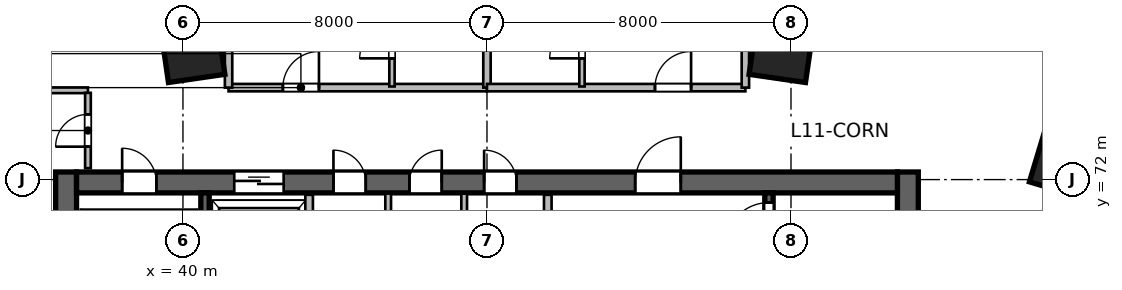
"""IFC4 building model, lengths in metres.
Left out: names, types, materials, properties, quantities, classifications, styles, units other than length and angle.
Written with IfcOpenShell. Run it as: python <this file> out.ifc"""

import sys

from ifc_helpers import new_model, si_unit, direction, frame, frame_2d, origin, origin_2d, place, context, subcontext, project, spatial, rectangle, extrude, source, transform, mapped, element, fill, save


model = new_model("IFC4")
c1 = context("Model", 3, precision=1e-05, world=origin(), true_north=direction((0.0, 1.0)))
c2 = subcontext(c1, "Body", "Model", "MODEL_VIEW")
j1 = project(units=[si_unit("LENGTHUNIT", "METRE"), si_unit("PLANEANGLEUNIT", "RADIAN")], contexts=[c1])
p1 = place(None, origin())
s1 = spatial("IfcSite", under=j1, at=p1, CompositionType="ELEMENT")
p2 = place(p1, origin())
s2 = spatial("IfcBuilding", under=s1, at=p2, CompositionType="ELEMENT")
p3 = place(p2, frame((0.0, 0.0, 53.4)))
s3 = spatial("IfcBuildingStorey", under=s2, at=p3, CompositionType="ELEMENT", Elevation=53.4)
m1 = source(origin(), c2, "Body", "SweptSolid", [
    extrude(rectangle(XDim=12.0, YDim=0.55, at=frame_2d((6.0, 0.0))), origin(), (0.0, 0.0, 1.0), 3.6),
])
for number, where, z_axis, x_axis in (
    (1, (36.925, 60.2, 0.0), (0.0, 0.0, 1.0), (0.0, 1.0, 0.0)),
    (2, (59.075, 60.2, 0.0), (0.0, 0.0, 1.0), (0.0, 1.0, 0.0)),
):
    element("IfcWall", number, at=place(p3, frame(where, z_axis=z_axis, x_axis=x_axis)), inside=s3, PredefinedType="SHEAR", context=c2, shape_type="MappedRepresentation", body=[
        mapped(m1, transform((0.0, 0.0, 0.0), scale=1.0)),
    ])
m2 = source(origin(), c2, "Body", "SweptSolid", [
    extrude(rectangle(XDim=21.6, YDim=0.55, at=frame_2d((10.8, 0.0))), origin(), (0.0, 0.0, 1.0), 3.6),
])
p4 = place(p3, frame((37.2, 71.925, 0.0), z_axis=(0.0, 0.0, 1.0), x_axis=(1.0, 0.0, 0.0)))
e3 = element("IfcWall", 3, at=p4, inside=s3, PredefinedType="SHEAR", context=c2, shape_type="MappedRepresentation", body=[
    mapped(m2, transform((0.0, 0.0, 0.0), scale=1.0)),
])
p5 = place(p4, frame((1.2, 0.0, 0.0)))
e4 = element("IfcOpeningElement", 4, at=p5, cuts=e3, PredefinedType="OPENING", context=c2, shape_type="SweptSolid", body=[
    extrude(rectangle(XDim=0.9, YDim=2.1, at=frame_2d((0.45, 1.05))), frame((0.0, 0.285, 0.0), z_axis=(0.0, -1.0, 0.0), x_axis=(1.0, 0.0, 0.0)), (0.0, 0.0, 1.0), 0.57),
])
p6 = place(p4, frame((14.7, 0.0, 0.0)))
e5 = element("IfcOpeningElement", 5, at=p6, cuts=e3, PredefinedType="OPENING", context=c2, shape_type="SweptSolid", body=[
    extrude(rectangle(XDim=1.2, YDim=2.15, at=frame_2d((0.6, 1.075))), frame((0.0, 0.285, 0.0), z_axis=(0.0, -1.0, 0.0), x_axis=(1.0, 0.0, 0.0)), (0.0, 0.0, 1.0), 0.57),
])
p7 = place(p4, frame((4.15, 0.0, 0.0)))
e6 = element("IfcOpeningElement", 6, at=p7, cuts=e3, PredefinedType="OPENING", context=c2, shape_type="SweptSolid", body=[
    extrude(rectangle(XDim=1.3, YDim=2.15, at=frame_2d((0.65, 1.075))), frame((0.0, 0.285, 0.0), z_axis=(0.0, -1.0, 0.0), x_axis=(1.0, 0.0, 0.0)), (0.0, 0.0, 1.0), 0.57),
])
p8 = place(p4, frame((6.76, 0.0, 0.0)))
e7 = element("IfcOpeningElement", 7, at=p8, cuts=e3, PredefinedType="OPENING", context=c2, shape_type="SweptSolid", body=[
    extrude(rectangle(XDim=0.85, YDim=2.1, at=frame_2d((0.425, 1.05))), frame((0.0, 0.285, 0.0), z_axis=(0.0, -1.0, 0.0), x_axis=(1.0, 0.0, 0.0)), (0.0, 0.0, 1.0), 0.57),
])
p9 = place(p4, frame((8.76, 0.0, 0.0)))
e8 = element("IfcOpeningElement", 8, at=p9, cuts=e3, PredefinedType="OPENING", context=c2, shape_type="SweptSolid", body=[
    extrude(rectangle(XDim=0.85, YDim=2.1, at=frame_2d((0.425, 1.05))), frame((0.0, 0.285, 0.0), z_axis=(0.0, -1.0, 0.0), x_axis=(1.0, 0.0, 0.0)), (0.0, 0.0, 1.0), 0.57),
])
p10 = place(p4, frame((10.725, 0.0, 0.0)))
e9 = element("IfcOpeningElement", 9, at=p10, cuts=e3, PredefinedType="OPENING", context=c2, shape_type="SweptSolid", body=[
    extrude(rectangle(XDim=0.85, YDim=2.1, at=frame_2d((0.425, 1.05))), frame((0.0, 0.285, 0.0), z_axis=(0.0, -1.0, 0.0), x_axis=(1.0, 0.0, 0.0)), (0.0, 0.0, 1.0), 0.57),
])
m3 = source(origin(), c2, "Body", "SweptSolid", [
    extrude(rectangle(XDim=10.9, YDim=0.22, at=frame_2d((5.45, 0.0))), origin(), (0.0, 0.0, 1.0), 3.6),
])
p11 = place(p3, frame((40.58, 60.75, 0.0), z_axis=(0.0, 0.0, 1.0), x_axis=(0.0, 1.0, 0.0)))
e10 = element("IfcWall", 10, at=p11, inside=s3, PredefinedType="SHEAR", context=c2, shape_type="MappedRepresentation", body=[
    mapped(m3, transform((0.0, 0.0, 0.0), scale=1.0)),
])
p12 = place(p3, frame((55.42, 60.75, 0.0), z_axis=(0.0, 0.0, 1.0), x_axis=(0.0, 1.0, 0.0)))
e11 = element("IfcWall", 11, at=p12, inside=s3, PredefinedType="SHEAR", context=c2, shape_type="MappedRepresentation", body=[
    mapped(m3, transform((0.0, 0.0, 0.0), scale=1.0)),
])
p13 = place(p12, frame((9.495, 0.0, 0.0)))
e12 = element("IfcOpeningElement", 12, at=p13, cuts=e11, PredefinedType="OPENING", context=c2, shape_type="SweptSolid", body=[
    extrude(rectangle(XDim=1.15, YDim=2.15, at=frame_2d((0.575, 1.075))), frame((0.0, 0.12, 0.0), z_axis=(0.0, -1.0, 0.0), x_axis=(1.0, 0.0, 0.0)), (0.0, 0.0, 1.0), 0.24),
])
m4 = source(origin(), c2, "Body", "SweptSolid", [
    extrude(rectangle(XDim=1.5, YDim=1.5, at=origin_2d()), origin(), (0.0, 0.0, 1.0), 3.6),
])
for number, where, z_axis, x_axis in (
    (13, (40.253, 75.404, 0.0), (0.0, 0.0, 1.0), (-0.143, 0.99, 0.0)),
    (14, (55.747, 75.404, 0.0), (0.0, 0.0, 1.0), (0.143, 0.99, 0.0)),
    (15, (63.209, 72.442, 0.0), (0.0, 0.0, 1.0), (0.289, 0.957, 0.0)),
):
    element("IfcColumn", number, at=place(p3, frame(where, z_axis=z_axis, x_axis=x_axis)), inside=s3, PredefinedType="COLUMN", context=c2, shape_type="MappedRepresentation", body=[
        mapped(m4, transform((0.0, 0.0, 0.0), scale=1.0)),
    ])
m5 = source(origin(), c2, "Body", "SweptSolid", [
    extrude(rectangle(XDim=5.8, YDim=0.2, at=frame_2d((2.9, 0.0))), origin(), (0.0, 0.0, 1.0), 3.36),
])
p14 = place(p3, frame((49.6, 65.8, 0.0), z_axis=(0.0, 0.0, 1.0), x_axis=(0.0, 1.0, 0.0)))
e16 = element("IfcWall", 16, at=p14, inside=s3, PredefinedType="SOLIDWALL", context=c2, shape_type="MappedRepresentation", body=[
    mapped(m5, transform((0.0, 0.0, 0.0), scale=1.0)),
])
m6 = source(origin(), c2, "Body", "SweptSolid", [
    extrude(rectangle(XDim=3.2, YDim=0.2, at=frame_2d((1.6, 0.0))), origin(), (0.0, 0.0, 1.0), 3.36),
])
p15 = place(p3, frame((43.32, 68.4, 0.0), z_axis=(0.0, 0.0, 1.0), x_axis=(0.0, 1.0, 0.0)))
e17 = element("IfcWall", 17, at=p15, inside=s3, PredefinedType="SOLIDWALL", context=c2, shape_type="MappedRepresentation", body=[
    mapped(m6, transform((0.0, 0.0, 0.0), scale=1.0)),
])
m7 = source(origin(), c2, "Body", "SweptSolid", [
    extrude(rectangle(XDim=3.23, YDim=0.15, at=frame_2d((1.615, 0.0))), origin(), (0.0, 0.0, 1.0), 3.36),
])
for number, where, z_axis, x_axis in (
    (18, (45.4, 68.4, 0.0), (0.0, 0.0, 1.0), (0.0, 1.0, 0.0)),
    (19, (47.4, 68.4, 0.0), (0.0, 0.0, 1.0), (0.0, 1.0, 0.0)),
):
    element("IfcWall", number, at=place(p3, frame(where, z_axis=z_axis, x_axis=x_axis)), inside=s3, PredefinedType="PARTITIONING", context=c2, shape_type="MappedRepresentation", body=[
        mapped(m7, transform((0.0, 0.0, 0.0), scale=1.0)),
    ])
m8 = source(origin(), c2, "Body", "SweptSolid", [
    extrude(rectangle(XDim=3.1, YDim=0.15, at=frame_2d((1.55, 0.0))), origin(), (0.0, 0.0, 1.0), 2.729),
])
p16 = place(p3, frame((34.4, 74.35, 0.0), z_axis=(0.0, 0.0, 1.0), x_axis=(1.0, 0.0, 0.0)))
e20 = element("IfcWall", 20, at=p16, inside=s3, PredefinedType="PARTITIONING", context=c2, shape_type="MappedRepresentation", body=[
    mapped(m8, transform((0.0, 0.0, 0.0), scale=1.0)),
])
m9 = source(origin(), c2, "Body", "SweptSolid", [
    extrude(rectangle(XDim=1.982, YDim=0.15, at=frame_2d((0.991, 0.0))), origin(), (0.0, 0.0, 1.0), 3.36),
])
p17 = place(p3, frame((37.5, 72.3, 0.0), z_axis=(0.0, 0.0, 1.0), x_axis=(0.0, 1.0, 0.0)))
e21 = element("IfcWall", 21, at=p17, inside=s3, PredefinedType="PARTITIONING", context=c2, shape_type="MappedRepresentation", body=[
    mapped(m9, transform((0.0, 0.0, 0.0), scale=1.0)),
])
p18 = place(p17, frame((0.566, 0.0, 0.0)))
e22 = element("IfcOpeningElement", 22, at=p18, cuts=e21, PredefinedType="OPENING", context=c2, shape_type="SweptSolid", body=[
    extrude(rectangle(XDim=0.85, YDim=2.1, at=frame_2d((0.425, 1.05))), frame((0.0, 0.085, 0.0), z_axis=(0.0, -1.0, 0.0), x_axis=(1.0, 0.0, 0.0)), (0.0, 0.0, 1.0), 0.17),
])
m10 = source(origin(), c2, "Body", "SweptSolid", [
    extrude(rectangle(XDim=6.8, YDim=0.195, at=frame_2d((3.4, 0.0))), origin(), (0.0, 0.0, 1.0), 3.36),
])
p19 = place(p3, frame((41.2, 74.42, 0.0), z_axis=(0.0, 0.0, 1.0), x_axis=(1.0, 0.0, 0.0)))
e23 = element("IfcWall", 23, at=p19, inside=s3, PredefinedType="PARTITIONING", context=c2, shape_type="MappedRepresentation", body=[
    mapped(m10, transform((0.0, 0.0, 0.0), scale=1.0)),
])
p20 = place(p19, frame((1.429, 0.0, 0.0)))
e24 = element("IfcOpeningElement", 24, at=p20, cuts=e23, PredefinedType="OPENING", context=c2, shape_type="SweptSolid", body=[
    extrude(rectangle(XDim=0.95, YDim=2.15, at=frame_2d((0.475, 1.075))), frame((0.0, 0.107, 0.0), z_axis=(0.0, -1.0, 0.0), x_axis=(1.0, 0.0, 0.0)), (0.0, 0.0, 1.0), 0.215),
])
m11 = source(origin(), c2, "Body", "SweptSolid", [
    extrude(rectangle(XDim=6.216, YDim=0.195, at=frame_2d((3.108, 0.0))), origin(), (0.0, 0.0, 1.0), 2.644),
])
p21 = place(p3, frame((48.0, 74.42, 0.0), z_axis=(0.0, 0.0, 1.0), x_axis=(0.0, 1.0, 0.0)))
e25 = element("IfcWall", 25, at=p21, inside=s3, PredefinedType="PARTITIONING", context=c2, shape_type="MappedRepresentation", body=[
    mapped(m11, transform((0.0, 0.0, 0.0), scale=1.0)),
])
m12 = source(origin(), c2, "Body", "SweptSolid", [
    extrude(rectangle(XDim=5.426, YDim=0.195, at=frame_2d((2.713, 0.0))), origin(), (0.0, 0.0, 1.0), 3.36),
])
p22 = place(p3, frame((41.2, 74.42, 0.0), z_axis=(0.0, 0.0, 1.0), x_axis=(0.0, 1.0, 0.0)))
e26 = element("IfcWall", 26, at=p22, inside=s3, PredefinedType="PARTITIONING", context=c2, shape_type="MappedRepresentation", body=[
    mapped(m12, transform((0.0, 0.0, 0.0), scale=1.0)),
])
m13 = source(origin(), c2, "Body", "SweptSolid", [
    extrude(rectangle(XDim=2.33, YDim=0.14, at=frame_2d((1.165, 0.0))), origin(), (0.0, 0.0, 1.0), 3.36),
])
p23 = place(p3, frame((45.5, 74.45, 0.0), z_axis=(0.0, 0.0, 1.0), x_axis=(0.0, 1.0, 0.0)))
e27 = element("IfcWall", 27, at=p23, inside=s3, PredefinedType="PARTITIONING", context=c2, shape_type="MappedRepresentation", body=[
    mapped(m13, transform((0.0, 0.0, 0.0), scale=1.0)),
])
p24 = place(p23, frame((0.74, 0.0, 0.0)))
e28 = element("IfcOpeningElement", 28, at=p24, cuts=e27, PredefinedType="OPENING", context=c2, shape_type="SweptSolid", body=[
    extrude(rectangle(XDim=0.85, YDim=2.05, at=frame_2d((0.425, 1.025))), frame((0.0, 0.08, 0.0), z_axis=(0.0, -1.0, 0.0), x_axis=(1.0, 0.0, 0.0)), (0.0, 0.0, 1.0), 0.16),
])
p25 = place(p3, frame((48.0, 74.42, 0.0), z_axis=(0.0, 0.0, 1.0), x_axis=(1.0, 0.0, 0.0)))
e29 = element("IfcWall", 29, at=p25, inside=s3, PredefinedType="PARTITIONING", context=c2, shape_type="MappedRepresentation", body=[
    mapped(m10, transform((0.0, 0.0, 0.0), scale=1.0)),
])
p26 = place(p25, frame((4.421, 0.0, 0.0)))
e30 = element("IfcOpeningElement", 30, at=p26, cuts=e29, PredefinedType="OPENING", context=c2, shape_type="SweptSolid", body=[
    extrude(rectangle(XDim=0.95, YDim=2.15, at=frame_2d((0.475, 1.075))), frame((0.0, 0.107, 0.0), z_axis=(0.0, -1.0, 0.0), x_axis=(1.0, 0.0, 0.0)), (0.0, 0.0, 1.0), 0.215),
])
p27 = place(p3, frame((54.8, 74.42, 0.0), z_axis=(0.0, 0.0, 1.0), x_axis=(0.0, 1.0, 0.0)))
e31 = element("IfcWall", 31, at=p27, inside=s3, PredefinedType="PARTITIONING", context=c2, shape_type="MappedRepresentation", body=[
    mapped(m12, transform((0.0, 0.0, 0.0), scale=1.0)),
])
p28 = place(p3, frame((50.5, 74.45, 0.0), z_axis=(0.0, 0.0, 1.0), x_axis=(0.0, 1.0, 0.0)))
e32 = element("IfcWall", 32, at=p28, inside=s3, PredefinedType="PARTITIONING", context=c2, shape_type="MappedRepresentation", body=[
    mapped(m13, transform((0.0, 0.0, 0.0), scale=1.0)),
])
p29 = place(p28, frame((0.74, 0.0, 0.0)))
e33 = element("IfcOpeningElement", 33, at=p29, cuts=e32, PredefinedType="OPENING", context=c2, shape_type="SweptSolid", body=[
    extrude(rectangle(XDim=0.85, YDim=2.05, at=frame_2d((0.425, 1.025))), frame((0.0, 0.08, 0.0), z_axis=(0.0, -1.0, 0.0), x_axis=(1.0, 0.0, 0.0)), (0.0, 0.0, 1.0), 0.16),
])
m14 = source(origin(), c2, "Body", "SweptSolid", [
    extrude(rectangle(XDim=0.9, YDim=2.1, at=frame_2d((0.45, 1.05))), frame((0.0, 0.025, 0.0), z_axis=(0.0, -1.0, 0.0), x_axis=(1.0, 0.0, 0.0)), (0.0, 0.0, 1.0), 0.05),
])
p30 = place(p5, origin())
e34 = element("IfcDoor", 34, at=p30, inside=s3, OperationType="SINGLE_SWING_LEFT", PredefinedType="DOOR", context=c2, shape_type="MappedRepresentation", body=[
    mapped(m14, transform((0.0, 0.0, 0.0), scale=1.0)),
])
fill(e4, e34)
m15 = source(origin(), c2, "Body", "SweptSolid", [
    extrude(rectangle(XDim=1.15, YDim=2.15, at=frame_2d((0.575, 1.075))), frame((0.0, 0.025, 0.0), z_axis=(0.0, -1.0, 0.0), x_axis=(1.0, 0.0, 0.0)), (0.0, 0.0, 1.0), 0.05),
])
p31 = place(p13, origin())
e35 = element("IfcDoor", 35, at=p31, inside=s3, OperationType="SINGLE_SWING_LEFT", PredefinedType="DOOR", context=c2, shape_type="MappedRepresentation", body=[
    mapped(m15, transform((0.0, 0.0, 0.0), scale=1.0)),
])
fill(e12, e35)
m16 = source(origin(), c2, "Body", "SweptSolid", [
    extrude(rectangle(XDim=1.2, YDim=2.15, at=frame_2d((0.6, 1.075))), frame((0.0, 0.025, 0.0), z_axis=(0.0, -1.0, 0.0), x_axis=(1.0, 0.0, 0.0)), (0.0, 0.0, 1.0), 0.05),
])
p32 = place(p6, origin())
e36 = element("IfcDoor", 36, at=p32, inside=s3, OperationType="SINGLE_SWING_RIGHT", PredefinedType="DOOR", context=c2, shape_type="MappedRepresentation", body=[
    mapped(m16, transform((0.0, 0.0, 0.0), scale=1.0)),
])
fill(e5, e36)
m17 = source(origin(), c2, "Body", "SweptSolid", [
    extrude(rectangle(XDim=1.3, YDim=2.15, at=frame_2d((0.65, 1.075))), frame((0.0, 0.025, 0.0), z_axis=(0.0, -1.0, 0.0), x_axis=(1.0, 0.0, 0.0)), (0.0, 0.0, 1.0), 0.05),
])
p33 = place(p7, origin())
e37 = element("IfcDoor", 37, at=p33, inside=s3, OperationType="DOUBLE_DOOR_SLIDING", PredefinedType="DOOR", context=c2, shape_type="MappedRepresentation", body=[
    mapped(m17, transform((0.0, 0.0, 0.0), scale=1.0)),
])
fill(e6, e37)
m18 = source(origin(), c2, "Body", "SweptSolid", [
    extrude(rectangle(XDim=0.85, YDim=2.1, at=frame_2d((0.425, 1.05))), frame((0.0, 0.025, 0.0), z_axis=(0.0, -1.0, 0.0), x_axis=(1.0, 0.0, 0.0)), (0.0, 0.0, 1.0), 0.05),
])
p34 = place(p8, origin())
e38 = element("IfcDoor", 38, at=p34, inside=s3, OperationType="SINGLE_SWING_LEFT", PredefinedType="DOOR", context=c2, shape_type="MappedRepresentation", body=[
    mapped(m18, transform((0.0, 0.0, 0.0), scale=1.0)),
])
fill(e7, e38)
p35 = place(p9, origin())
e39 = element("IfcDoor", 39, at=p35, inside=s3, OperationType="SINGLE_SWING_RIGHT", PredefinedType="DOOR", context=c2, shape_type="MappedRepresentation", body=[
    mapped(m18, transform((0.0, 0.0, 0.0), scale=1.0)),
])
fill(e8, e39)
p36 = place(p10, origin())
e40 = element("IfcDoor", 40, at=p36, inside=s3, OperationType="SINGLE_SWING_LEFT", PredefinedType="DOOR", context=c2, shape_type="MappedRepresentation", body=[
    mapped(m18, transform((0.0, 0.0, 0.0), scale=1.0)),
])
fill(e9, e40)
p37 = place(p18, origin())
e41 = element("IfcDoor", 41, at=p37, inside=s3, OperationType="SINGLE_SWING_LEFT", PredefinedType="DOOR", context=c2, shape_type="MappedRepresentation", body=[
    mapped(m18, transform((0.0, 0.0, 0.0), scale=1.0)),
])
fill(e22, e41)
m19 = source(origin(), c2, "Body", "SweptSolid", [
    extrude(rectangle(XDim=0.95, YDim=2.15, at=frame_2d((0.475, 1.075))), frame((0.0, 0.025, 0.0), z_axis=(0.0, -1.0, 0.0), x_axis=(1.0, 0.0, 0.0)), (0.0, 0.0, 1.0), 0.05),
])
p38 = place(p20, origin())
e42 = element("IfcDoor", 42, at=p38, inside=s3, OperationType="SINGLE_SWING_RIGHT", PredefinedType="DOOR", context=c2, shape_type="MappedRepresentation", body=[
    mapped(m19, transform((0.0, 0.0, 0.0), scale=1.0)),
])
fill(e24, e42)
m20 = source(origin(), c2, "Body", "SweptSolid", [
    extrude(rectangle(XDim=0.85, YDim=2.05, at=frame_2d((0.425, 1.025))), frame((0.0, 0.025, 0.0), z_axis=(0.0, -1.0, 0.0), x_axis=(1.0, 0.0, 0.0)), (0.0, 0.0, 1.0), 0.05),
])
p39 = place(p24, origin())
e43 = element("IfcDoor", 43, at=p39, inside=s3, OperationType="SINGLE_SWING_LEFT", PredefinedType="DOOR", context=c2, shape_type="MappedRepresentation", body=[
    mapped(m20, transform((0.0, 0.0, 0.0), scale=1.0)),
])
fill(e28, e43)
p40 = place(p26, origin())
e44 = element("IfcDoor", 44, at=p40, inside=s3, OperationType="SINGLE_SWING_RIGHT", PredefinedType="DOOR", context=c2, shape_type="MappedRepresentation", body=[
    mapped(m19, transform((0.0, 0.0, 0.0), scale=1.0)),
])
fill(e30, e44)
p41 = place(p29, origin())
e45 = element("IfcDoor", 45, at=p41, inside=s3, OperationType="SINGLE_SWING_LEFT", PredefinedType="DOOR", context=c2, shape_type="MappedRepresentation", body=[
    mapped(m20, transform((0.0, 0.0, 0.0), scale=1.0)),
])
fill(e33, e45)
save(model, sys.argv[1])
